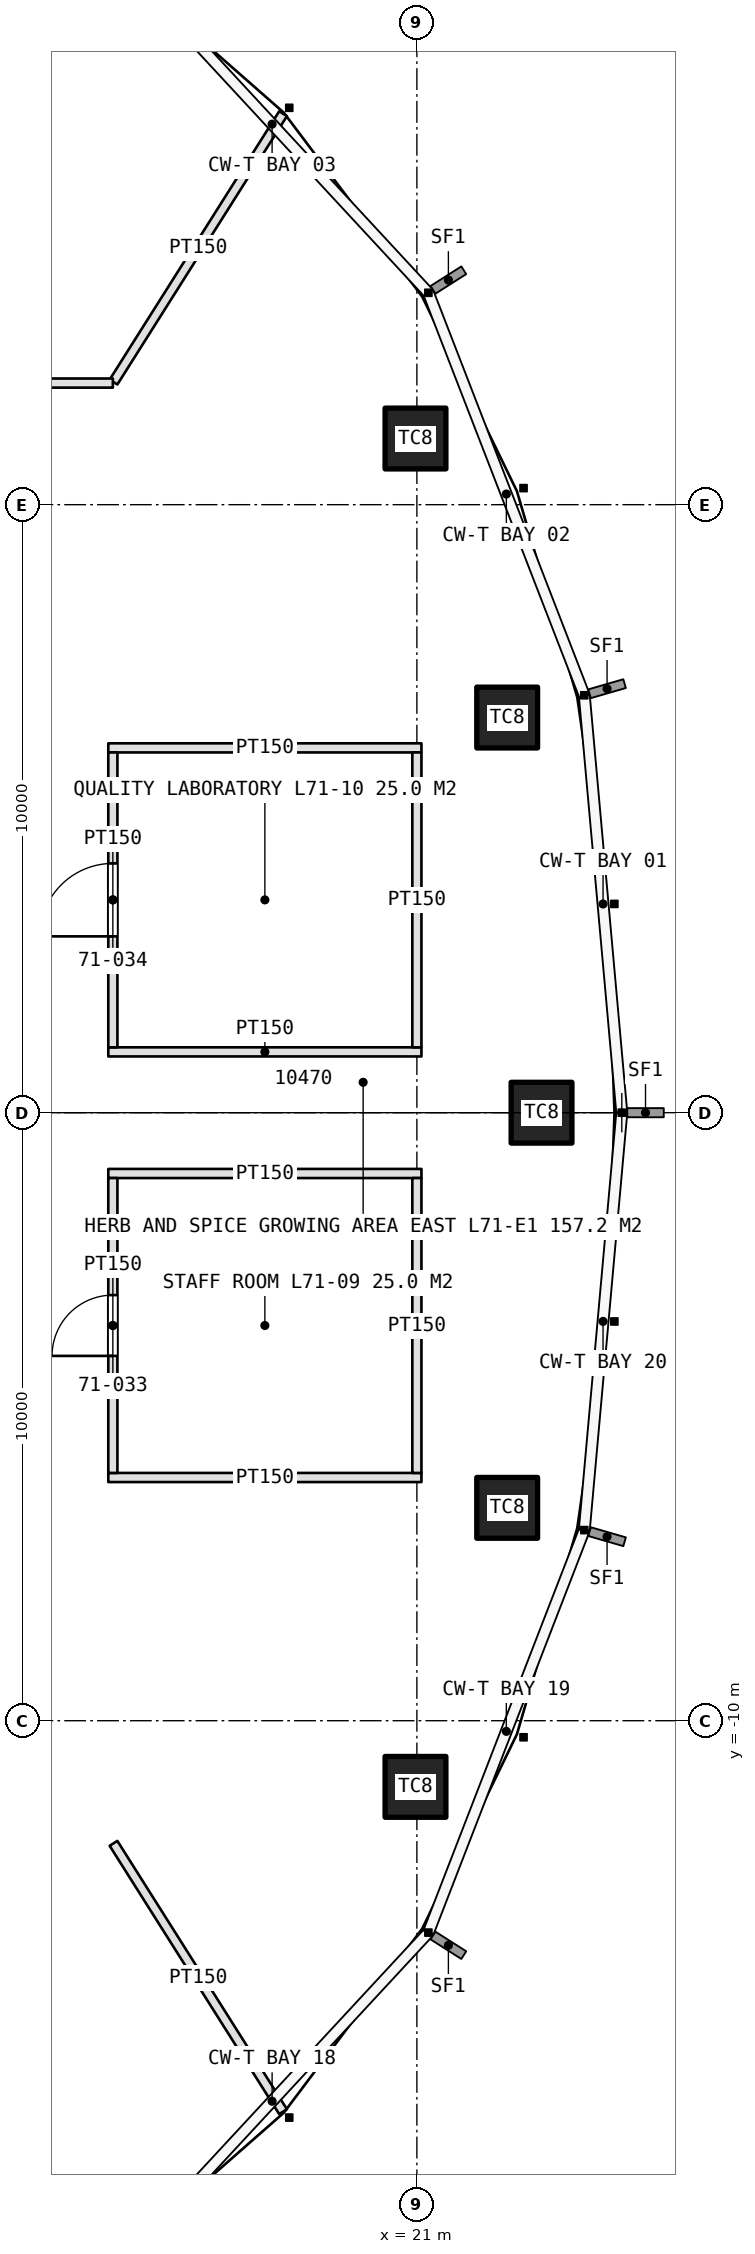
"""IFC4 building model, lengths in metres.
Left out: names, types, materials, properties, quantities, classifications, styles, units other than length and angle.
Written with IfcOpenShell. Run it as: python <this file> out.ifc"""

import sys

from ifc_helpers import new_model, si_unit, direction, frame, frame_2d, origin, origin_2d, place, context, subcontext, project, spatial, rectangle, extrude, element, fill, save


model = new_model("IFC4")
c1 = context("Model", 3, precision=1e-05, world=origin(), true_north=direction((0.0, 1.0)))
c2 = subcontext(c1, "Body", "Model", "MODEL_VIEW")
j1 = project(units=[si_unit("LENGTHUNIT", "METRE"), si_unit("PLANEANGLEUNIT", "RADIAN")], contexts=[c1])
p1 = place(None, origin())
s1 = spatial("IfcSite", under=j1, at=p1, CompositionType="ELEMENT")
p2 = place(p1, origin())
s2 = spatial("IfcBuilding", under=s1, at=p2, CompositionType="ELEMENT")
p3 = place(p2, frame((0.0, 0.0, 317.4)))
s3 = spatial("IfcBuildingStorey", under=s2, at=p3, CompositionType="ELEMENT", Elevation=317.4)
for number, where, z_axis, x_axis in (
    (1, (23.05, 0.0, 0.0), (0.0, 0.0, 1.0), (1.0, 0.0, 0.0)),
    (2, (22.485, 6.499, 0.0), (0.0, 0.0, 1.0), (1.0, 0.0, 0.0)),
    (3, (20.977, 11.088, 0.0), (0.0, 0.0, 1.0), (1.0, 0.0, 0.0)),
    (4, (20.977, -11.088, 0.0), (0.0, 0.0, 1.0), (1.0, 0.0, 0.0)),
    (5, (22.485, -6.499, 0.0), (0.0, 0.0, 1.0), (1.0, 0.0, 0.0)),
):
    element("IfcColumn", number, at=place(p3, frame(where, z_axis=z_axis, x_axis=x_axis)), inside=s3, PredefinedType="COLUMN", context=c2, shape_type="SweptSolid", body=[
        extrude(rectangle(XDim=1.0, YDim=1.0, at=origin_2d()), origin(), (0.0, 0.0, 1.0), 4.2),
    ])
for number, where, z_axis, x_axis in (
    (6, (15.925, -6.0, 0.0), (0.0, 0.0, 1.0), (1.0, 0.0, 0.0)),
    (7, (15.925, -1.0, 0.0), (0.0, 0.0, 1.0), (1.0, 0.0, 0.0)),
):
    element("IfcWall", number, at=place(p3, frame(where, z_axis=z_axis, x_axis=x_axis)), inside=s3, PredefinedType="PARTITIONING", context=c2, shape_type="SweptSolid", body=[
        extrude(rectangle(XDim=5.15, YDim=0.15, at=frame_2d((2.575, 0.0))), origin(), (0.0, 0.0, 1.0), 3.0),
    ])
p4 = place(p3, frame((16.0, -5.925, 0.0), z_axis=(0.0, 0.0, 1.0), x_axis=(0.0, 1.0, 0.0)))
e8 = element("IfcWall", 8, at=p4, inside=s3, PredefinedType="PARTITIONING", context=c2, shape_type="SweptSolid", body=[
    extrude(rectangle(XDim=4.85, YDim=0.15, at=frame_2d((2.425, 0.0))), origin(), (0.0, 0.0, 1.0), 3.0),
])
p5 = place(p4, frame((1.925, 0.0, 0.0)))
e9 = element("IfcOpeningElement", 9, at=p5, cuts=e8, PredefinedType="OPENING", context=c2, shape_type="SweptSolid", body=[
    extrude(rectangle(XDim=1.0, YDim=2.2, at=frame_2d((0.5, 1.1))), frame((0.0, 0.085, 0.0), z_axis=(0.0, -1.0, 0.0), x_axis=(1.0, 0.0, 0.0)), (0.0, 0.0, 1.0), 0.17),
])
p6 = place(p3, frame((21.0, -5.925, 0.0), z_axis=(0.0, 0.0, 1.0), x_axis=(0.0, 1.0, 0.0)))
e10 = element("IfcWall", 10, at=p6, inside=s3, PredefinedType="PARTITIONING", context=c2, shape_type="SweptSolid", body=[
    extrude(rectangle(XDim=4.85, YDim=0.15, at=frame_2d((2.425, 0.0))), origin(), (0.0, 0.0, 1.0), 3.0),
])
for number, where, z_axis, x_axis in (
    (11, (15.925, 1.0, 0.0), (0.0, 0.0, 1.0), (1.0, 0.0, 0.0)),
    (12, (15.925, 6.0, 0.0), (0.0, 0.0, 1.0), (1.0, 0.0, 0.0)),
):
    element("IfcWall", number, at=place(p3, frame(where, z_axis=z_axis, x_axis=x_axis)), inside=s3, PredefinedType="PARTITIONING", context=c2, shape_type="SweptSolid", body=[
        extrude(rectangle(XDim=5.15, YDim=0.15, at=frame_2d((2.575, 0.0))), origin(), (0.0, 0.0, 1.0), 3.0),
    ])
p7 = place(p3, frame((16.0, 1.075, 0.0), z_axis=(0.0, 0.0, 1.0), x_axis=(0.0, 1.0, 0.0)))
e13 = element("IfcWall", 13, at=p7, inside=s3, PredefinedType="PARTITIONING", context=c2, shape_type="SweptSolid", body=[
    extrude(rectangle(XDim=4.85, YDim=0.15, at=frame_2d((2.425, 0.0))), origin(), (0.0, 0.0, 1.0), 3.0),
])
p8 = place(p7, frame((1.825, 0.0, 0.0)))
e14 = element("IfcOpeningElement", 14, at=p8, cuts=e13, PredefinedType="OPENING", context=c2, shape_type="SweptSolid", body=[
    extrude(rectangle(XDim=1.2, YDim=2.3, at=frame_2d((0.6, 1.15))), frame((0.0, 0.085, 0.0), z_axis=(0.0, -1.0, 0.0), x_axis=(1.0, 0.0, 0.0)), (0.0, 0.0, 1.0), 0.17),
])
p9 = place(p3, frame((21.0, 1.075, 0.0), z_axis=(0.0, 0.0, 1.0), x_axis=(0.0, 1.0, 0.0)))
e15 = element("IfcWall", 15, at=p9, inside=s3, PredefinedType="PARTITIONING", context=c2, shape_type="SweptSolid", body=[
    extrude(rectangle(XDim=4.85, YDim=0.15, at=frame_2d((2.425, 0.0))), origin(), (0.0, 0.0, 1.0), 3.0),
])
for number, where, z_axis, x_axis in (
    (16, (16.011, -12.017, 0.0), (0.0, 0.0, 1.0), (0.534, -0.845, 0.0)),
    (17, (16.011, 12.017, 0.0), (0.0, 0.0, 1.0), (0.534, 0.845, 0.0)),
):
    element("IfcWall", number, at=place(p3, frame(where, z_axis=z_axis, x_axis=x_axis)), inside=s3, PredefinedType="PARTITIONING", context=c2, shape_type="SweptSolid", body=[
        extrude(rectangle(XDim=5.22, YDim=0.15, at=frame_2d((2.61, 0.0))), origin(), (0.0, 0.0, 1.0), 3.0),
    ])
p10 = place(p3, frame((16.0, 12.0, 0.0), z_axis=(0.0, 0.0, 1.0), x_axis=(-1.0, 0.0, 0.0)))
e18 = element("IfcWall", 18, at=p10, inside=s3, PredefinedType="PARTITIONING", context=c2, shape_type="SweptSolid", body=[
    extrude(rectangle(XDim=5.0, YDim=0.15, at=frame_2d((2.5, 0.0))), origin(), (0.0, 0.0, 1.0), 3.0),
])
p11 = place(p5, origin())
e19 = element("IfcDoor", 19, at=p11, inside=s3, OperationType="SINGLE_SWING_LEFT", PredefinedType="DOOR", context=c2, shape_type="SweptSolid", body=[
    extrude(rectangle(XDim=1.0, YDim=2.2, at=frame_2d((0.5, 1.1))), frame((0.0, 0.025, 0.0), z_axis=(0.0, -1.0, 0.0), x_axis=(1.0, 0.0, 0.0)), (0.0, 0.0, 1.0), 0.05),
])
fill(e9, e19)
p12 = place(p8, origin())
e20 = element("IfcDoor", 20, at=p12, inside=s3, OperationType="SINGLE_SWING_LEFT", PredefinedType="DOOR", context=c2, shape_type="SweptSolid", body=[
    extrude(rectangle(XDim=1.2, YDim=2.3, at=frame_2d((0.6, 1.15))), frame((0.0, 0.025, 0.0), z_axis=(0.0, -1.0, 0.0), x_axis=(1.0, 0.0, 0.0)), (0.0, 0.0, 1.0), 0.05),
])
fill(e14, e20)
save(model, sys.argv[1])
